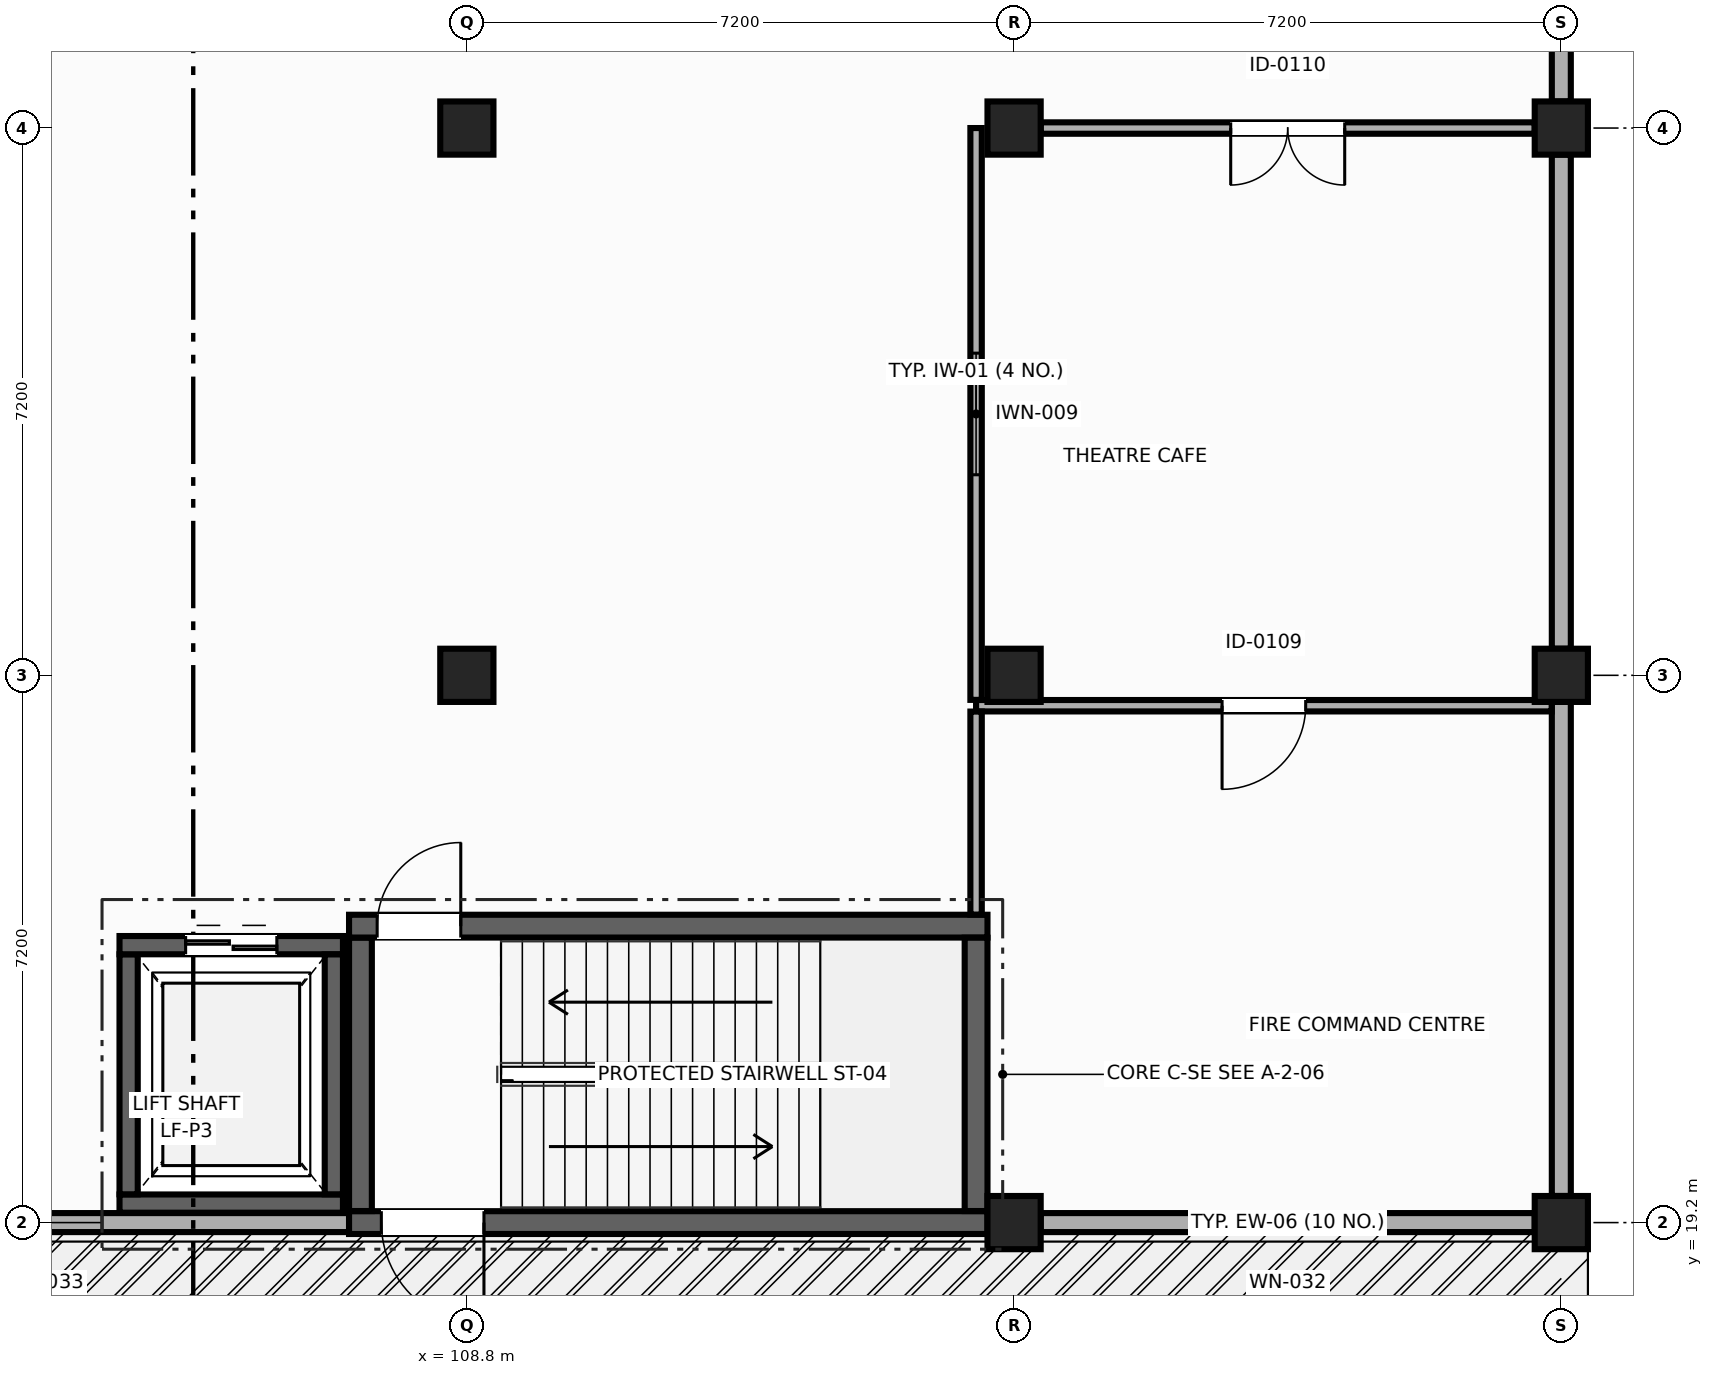
"""IFC4 building model, lengths in metres.
Left out: names, types, materials, properties, quantities, classifications, styles, units other than length and angle.
Written with IfcOpenShell. Run it as: python <this file> out.ifc"""

import sys

from ifc_helpers import new_model, si_unit, direction, frame, frame_2d, origin, origin_2d, place, context, subcontext, project, spatial, rectangle, extrude, element, fill, save


model = new_model("IFC4")
c1 = context("Model", 3, precision=1e-05, world=origin(), true_north=direction((0.0, 1.0)))
c2 = subcontext(c1, "Body", "Model", "MODEL_VIEW")
j1 = project(units=[si_unit("LENGTHUNIT", "METRE"), si_unit("PLANEANGLEUNIT", "RADIAN")], contexts=[c1])
p1 = place(None, origin())
s1 = spatial("IfcSite", under=j1, at=p1, CompositionType="ELEMENT")
p2 = place(p1, origin())
s2 = spatial("IfcBuilding", under=s1, at=p2, CompositionType="ELEMENT")
p3 = place(p2, origin())
s3 = spatial("IfcBuildingStorey", under=s2, at=p3, CompositionType="ELEMENT", Elevation=0.0)
for number, where, z_axis, x_axis in (
    (1, (116.0, 19.2, 0.0), (0.0, 0.0, 1.0), (0.0, 1.0, 0.0)),
    (2, (123.2, 19.2, 0.0), (0.0, 0.0, 1.0), (1.0, 0.0, 0.0)),
    (3, (108.8, 26.4, 0.0), (0.0, 0.0, 1.0), (0.0, 1.0, 0.0)),
    (4, (116.0, 26.4, 0.0), (0.0, 0.0, 1.0), (1.0, 0.0, 0.0)),
    (5, (123.2, 26.4, 0.0), (0.0, 0.0, 1.0), (0.0, 1.0, 0.0)),
    (6, (108.8, 33.6, 0.0), (0.0, 0.0, 1.0), (1.0, 0.0, 0.0)),
    (7, (116.0, 33.6, 0.0), (0.0, 0.0, 1.0), (0.0, 1.0, 0.0)),
    (8, (123.2, 33.6, 0.0), (0.0, 0.0, 1.0), (1.0, 0.0, 0.0)),
):
    element("IfcColumn", number, at=place(p3, frame(where, z_axis=z_axis, x_axis=x_axis)), inside=s3, PredefinedType="COLUMN", context=c2, shape_type="SweptSolid", body=[
        extrude(rectangle(XDim=0.7, YDim=0.7, at=origin_2d()), origin(), (0.0, 0.0, 1.0), 5.4),
    ])
p4 = place(p3, frame((122.85, 19.2, 0.0), z_axis=(0.0, 0.0, 1.0), x_axis=(-1.0, 0.0, 0.0)))
e9 = element("IfcWall", 9, at=p4, inside=s3, PredefinedType="SOLIDWALL", context=c2, shape_type="SweptSolid", body=[
    extrude(rectangle(XDim=6.5, YDim=0.25, at=frame_2d((3.25, 0.0))), origin(), (0.0, 0.0, 1.0), 4.395),
])
p5 = place(p4, frame((2.05, 0.0, 0.9)))
e10 = element("IfcOpeningElement", 10, at=p5, cuts=e9, PredefinedType="OPENING", context=c2, shape_type="SweptSolid", body=[
    extrude(rectangle(XDim=2.4, YDim=1.8, at=frame_2d((1.2, 0.9))), frame((0.0, 0.135, 0.0), z_axis=(0.0, -1.0, 0.0), x_axis=(1.0, 0.0, 0.0)), (0.0, 0.0, 1.0), 0.27),
])
p6 = place(p3, frame((107.25, 19.2, 0.0), z_axis=(0.0, 0.0, 1.0), x_axis=(-1.0, 0.0, 0.0)))
e11 = element("IfcWall", 11, at=p6, inside=s3, PredefinedType="SOLIDWALL", context=c2, shape_type="SweptSolid", body=[
    extrude(rectangle(XDim=5.3, YDim=0.25, at=frame_2d((2.65, 0.0))), origin(), (0.0, 0.0, 1.0), 4.755),
])
p7 = place(p6, frame((3.25, 0.0, 0.9)))
e12 = element("IfcOpeningElement", 12, at=p7, cuts=e11, PredefinedType="OPENING", context=c2, shape_type="SweptSolid", body=[
    extrude(rectangle(XDim=1.5, YDim=2.1, at=frame_2d((0.75, 1.05))), frame((0.0, 0.135, 0.0), z_axis=(0.0, -1.0, 0.0), x_axis=(1.0, 0.0, 0.0)), (0.0, 0.0, 1.0), 0.27),
])
p8 = place(p3, frame((123.2, 40.425, 0.0), z_axis=(0.0, 0.0, 1.0), x_axis=(0.0, -1.0, 0.0)))
e13 = element("IfcWall", 13, at=p8, inside=s3, PredefinedType="SOLIDWALL", context=c2, shape_type="SweptSolid", body=[
    extrude(rectangle(XDim=6.475, YDim=0.25, at=frame_2d((3.238, 0.0))), origin(), (0.0, 0.0, 1.0), 4.295),
])
for number, where, z_axis, x_axis in (
    (14, (123.2, 33.25, 0.0), (0.0, 0.0, 1.0), (0.0, -1.0, 0.0)),
    (15, (123.2, 26.05, 0.0), (0.0, 0.0, 1.0), (0.0, -1.0, 0.0)),
):
    element("IfcWall", number, at=place(p3, frame(where, z_axis=z_axis, x_axis=x_axis)), inside=s3, PredefinedType="SOLIDWALL", context=c2, shape_type="SweptSolid", body=[
        extrude(rectangle(XDim=6.5, YDim=0.25, at=frame_2d((3.25, 0.0))), origin(), (0.0, 0.0, 1.0), 4.295),
    ])
p9 = place(p3, frame((115.65, 19.2, 0.0), z_axis=(0.0, 0.0, 1.0), x_axis=(-1.0, 0.0, 0.0)))
e16 = element("IfcWall", 16, at=p9, inside=s3, PredefinedType="SHEAR", context=c2, shape_type="SweptSolid", body=[
    extrude(rectangle(XDim=8.4, YDim=0.3, at=frame_2d((4.2, 0.0))), origin(), (0.0, 0.0, 1.0), 5.1),
])
p10 = place(p9, frame((6.625, 0.0, 0.0)))
e17 = element("IfcOpeningElement", 17, at=p10, cuts=e16, PredefinedType="OPENING", context=c2, shape_type="SweptSolid", body=[
    extrude(rectangle(XDim=1.35, YDim=2.2, at=frame_2d((0.675, 1.1))), frame((0.0, 0.16, 0.0), z_axis=(0.0, -1.0, 0.0), x_axis=(1.0, 0.0, 0.0)), (0.0, 0.0, 1.0), 0.32),
])
p11 = place(p3, frame((107.4, 19.352, 0.0), z_axis=(0.0, 0.0, 1.0), x_axis=(0.0, 1.0, 0.0)))
e18 = element("IfcWall", 18, at=p11, inside=s3, PredefinedType="SHEAR", context=c2, shape_type="SweptSolid", body=[
    extrude(rectangle(XDim=3.598, YDim=0.3, at=frame_2d((1.799, 0.0))), origin(), (0.0, 0.0, 1.0), 5.1),
])
p12 = place(p3, frame((107.25, 23.1, 0.0), z_axis=(0.0, 0.0, 1.0), x_axis=(1.0, 0.0, 0.0)))
e19 = element("IfcWall", 19, at=p12, inside=s3, PredefinedType="SHEAR", context=c2, shape_type="SweptSolid", body=[
    extrude(rectangle(XDim=8.4, YDim=0.3, at=frame_2d((4.2, 0.0))), origin(), (0.0, 0.0, 1.0), 5.1),
])
p13 = place(p12, frame((0.37, 0.0, 0.0)))
e20 = element("IfcOpeningElement", 20, at=p13, cuts=e19, PredefinedType="OPENING", context=c2, shape_type="SweptSolid", body=[
    extrude(rectangle(XDim=1.1, YDim=2.15, at=frame_2d((0.55, 1.075))), frame((0.0, 0.16, 0.0), z_axis=(0.0, -1.0, 0.0), x_axis=(1.0, 0.0, 0.0)), (0.0, 0.0, 1.0), 0.32),
])
p14 = place(p3, frame((115.5, 22.948, 0.0), z_axis=(0.0, 0.0, 1.0), x_axis=(0.0, -1.0, 0.0)))
e21 = element("IfcWall", 21, at=p14, inside=s3, PredefinedType="SHEAR", context=c2, shape_type="SweptSolid", body=[
    extrude(rectangle(XDim=3.596, YDim=0.3, at=frame_2d((1.798, 0.0))), origin(), (0.0, 0.0, 1.0), 5.1),
])
p15 = place(p3, frame((107.17, 19.45, 0.0), z_axis=(0.0, 0.0, 1.0), x_axis=(-1.0, 0.0, 0.0)))
e22 = element("IfcWall", 22, at=p15, inside=s3, PredefinedType="SHEAR", context=c2, shape_type="SweptSolid", body=[
    extrude(rectangle(XDim=2.94, YDim=0.24, at=frame_2d((1.47, 0.0))), origin(), (0.0, 0.0, 1.0), 5.1),
])
p16 = place(p3, frame((104.35, 19.572, 0.0), z_axis=(0.0, 0.0, 1.0), x_axis=(0.0, 1.0, 0.0)))
e23 = element("IfcWall", 23, at=p16, inside=s3, PredefinedType="SHEAR", context=c2, shape_type="SweptSolid", body=[
    extrude(rectangle(XDim=3.158, YDim=0.24, at=frame_2d((1.579, 0.0))), origin(), (0.0, 0.0, 1.0), 5.1),
])
p17 = place(p3, frame((104.23, 22.85, 0.0), z_axis=(0.0, 0.0, 1.0), x_axis=(1.0, 0.0, 0.0)))
e24 = element("IfcWall", 24, at=p17, inside=s3, PredefinedType="SHEAR", context=c2, shape_type="SweptSolid", body=[
    extrude(rectangle(XDim=2.94, YDim=0.24, at=frame_2d((1.47, 0.0))), origin(), (0.0, 0.0, 1.0), 5.1),
])
p18 = place(p17, frame((0.87, 0.0, 0.0)))
e25 = element("IfcOpeningElement", 25, at=p18, cuts=e24, PredefinedType="OPENING", context=c2, shape_type="SweptSolid", body=[
    extrude(rectangle(XDim=1.2, YDim=2.15, at=frame_2d((0.6, 1.075))), frame((0.0, 0.13, 0.0), z_axis=(0.0, -1.0, 0.0), x_axis=(1.0, 0.0, 0.0)), (0.0, 0.0, 1.0), 0.26),
])
p19 = place(p3, frame((107.05, 22.728, 0.0), z_axis=(0.0, 0.0, 1.0), x_axis=(0.0, -1.0, 0.0)))
e26 = element("IfcWall", 26, at=p19, inside=s3, PredefinedType="SHEAR", context=c2, shape_type="SweptSolid", body=[
    extrude(rectangle(XDim=3.156, YDim=0.24, at=frame_2d((1.578, 0.0))), origin(), (0.0, 0.0, 1.0), 5.1),
])
p20 = place(p3, frame((123.073, 26.0, 0.0), z_axis=(0.0, 0.0, 1.0), x_axis=(-1.0, 0.0, 0.0)))
e27 = element("IfcWall", 27, at=p20, inside=s3, PredefinedType="PARTITIONING", context=c2, shape_type="SweptSolid", body=[
    extrude(rectangle(XDim=7.573, YDim=0.15, at=frame_2d((3.787, 0.0))), origin(), (0.0, 0.0, 1.0), 4.295),
])
p21 = place(p20, frame((3.237, 0.0, 0.0)))
e28 = element("IfcOpeningElement", 28, at=p21, cuts=e27, PredefinedType="OPENING", context=c2, shape_type="SweptSolid", body=[
    extrude(rectangle(XDim=1.1, YDim=2.15, at=frame_2d((0.55, 1.075))), frame((0.0, 0.085, 0.0), z_axis=(0.0, -1.0, 0.0), x_axis=(1.0, 0.0, 0.0)), (0.0, 0.0, 1.0), 0.17),
])
p22 = place(p3, frame((115.5, 25.923, 0.0), z_axis=(0.0, 0.0, 1.0), x_axis=(0.0, -1.0, 0.0)))
e29 = element("IfcWall", 29, at=p22, inside=s3, PredefinedType="PARTITIONING", context=c2, shape_type="SweptSolid", body=[
    extrude(rectangle(XDim=2.671, YDim=0.15, at=frame_2d((1.335, 0.0))), origin(), (0.0, 0.0, 1.0), 5.1),
])
p23 = place(p3, frame((122.85, 33.6, 0.0), z_axis=(0.0, 0.0, 1.0), x_axis=(-1.0, 0.0, 0.0)))
e30 = element("IfcWall", 30, at=p23, inside=s3, PredefinedType="PARTITIONING", context=c2, shape_type="SweptSolid", body=[
    extrude(rectangle(XDim=6.5, YDim=0.15, at=frame_2d((3.25, 0.0))), origin(), (0.0, 0.0, 1.0), 4.295),
])
p24 = place(p23, frame((2.5, 0.0, 0.0)))
e31 = element("IfcOpeningElement", 31, at=p24, cuts=e30, PredefinedType="OPENING", context=c2, shape_type="SweptSolid", body=[
    extrude(rectangle(XDim=1.5, YDim=2.2, at=frame_2d((0.75, 1.1))), frame((0.0, 0.085, 0.0), z_axis=(0.0, -1.0, 0.0), x_axis=(1.0, 0.0, 0.0)), (0.0, 0.0, 1.0), 0.17),
])
p25 = place(p3, frame((115.5, 33.6, 0.0), z_axis=(0.0, 0.0, 1.0), x_axis=(0.0, -1.0, 0.0)))
e32 = element("IfcWall", 32, at=p25, inside=s3, PredefinedType="PARTITIONING", context=c2, shape_type="SweptSolid", body=[
    extrude(rectangle(XDim=7.523, YDim=0.15, at=frame_2d((3.762, 0.0))), origin(), (0.0, 0.0, 1.0), 4.295),
])
p26 = place(p25, frame((2.961, 0.0, 1.1)))
e33 = element("IfcOpeningElement", 33, at=p26, cuts=e32, PredefinedType="OPENING", context=c2, shape_type="SweptSolid", body=[
    extrude(rectangle(XDim=1.6, YDim=1.1, at=frame_2d((0.8, 0.55))), frame((0.0, 0.085, 0.0), z_axis=(0.0, -1.0, 0.0), x_axis=(1.0, 0.0, 0.0)), (0.0, 0.0, 1.0), 0.17),
])
p27 = place(p5, origin())
e34 = element("IfcWindow", 34, at=p27, inside=s3, PartitioningType="SINGLE_PANEL", PredefinedType="WINDOW", context=c2, shape_type="SweptSolid", body=[
    extrude(rectangle(XDim=2.4, YDim=1.8, at=frame_2d((1.2, 0.9))), frame((0.0, 0.03, 0.0), z_axis=(0.0, -1.0, 0.0), x_axis=(1.0, 0.0, 0.0)), (0.0, 0.0, 1.0), 0.06),
])
fill(e10, e34)
p28 = place(p7, origin())
e35 = element("IfcWindow", 35, at=p28, inside=s3, PartitioningType="SINGLE_PANEL", PredefinedType="WINDOW", context=c2, shape_type="SweptSolid", body=[
    extrude(rectangle(XDim=1.5, YDim=2.1, at=frame_2d((0.75, 1.05))), frame((0.0, 0.03, 0.0), z_axis=(0.0, -1.0, 0.0), x_axis=(1.0, 0.0, 0.0)), (0.0, 0.0, 1.0), 0.06),
])
fill(e12, e35)
p29 = place(p10, origin())
e36 = element("IfcDoor", 36, at=p29, inside=s3, OperationType="SINGLE_SWING_LEFT", PredefinedType="DOOR", context=c2, shape_type="SweptSolid", body=[
    extrude(rectangle(XDim=1.35, YDim=2.2, at=frame_2d((0.675, 1.1))), frame((0.0, 0.025, 0.0), z_axis=(0.0, -1.0, 0.0), x_axis=(1.0, 0.0, 0.0)), (0.0, 0.0, 1.0), 0.05),
])
fill(e17, e36)
p30 = place(p13, origin())
e37 = element("IfcDoor", 37, at=p30, inside=s3, OperationType="SINGLE_SWING_RIGHT", PredefinedType="DOOR", context=c2, shape_type="SweptSolid", body=[
    extrude(rectangle(XDim=1.1, YDim=2.15, at=frame_2d((0.55, 1.075))), frame((0.0, 0.025, 0.0), z_axis=(0.0, -1.0, 0.0), x_axis=(1.0, 0.0, 0.0)), (0.0, 0.0, 1.0), 0.05),
])
fill(e20, e37)
p31 = place(p18, origin())
e38 = element("IfcDoor", 38, at=p31, inside=s3, OperationType="DOUBLE_DOOR_SLIDING", PredefinedType="DOOR", context=c2, shape_type="SweptSolid", body=[
    extrude(rectangle(XDim=1.2, YDim=2.15, at=frame_2d((0.6, 1.075))), frame((0.0, 0.025, 0.0), z_axis=(0.0, -1.0, 0.0), x_axis=(1.0, 0.0, 0.0)), (0.0, 0.0, 1.0), 0.05),
])
fill(e25, e38)
p32 = place(p21, origin())
e39 = element("IfcDoor", 39, at=p32, inside=s3, OperationType="SINGLE_SWING_RIGHT", PredefinedType="DOOR", context=c2, shape_type="SweptSolid", body=[
    extrude(rectangle(XDim=1.1, YDim=2.15, at=frame_2d((0.55, 1.075))), frame((0.0, 0.025, 0.0), z_axis=(0.0, -1.0, 0.0), x_axis=(1.0, 0.0, 0.0)), (0.0, 0.0, 1.0), 0.05),
])
fill(e28, e39)
p33 = place(p24, origin())
e40 = element("IfcDoor", 40, at=p33, inside=s3, OperationType="DOUBLE_DOOR_SINGLE_SWING", PredefinedType="DOOR", context=c2, shape_type="SweptSolid", body=[
    extrude(rectangle(XDim=1.5, YDim=2.2, at=frame_2d((0.75, 1.1))), frame((0.0, 0.025, 0.0), z_axis=(0.0, -1.0, 0.0), x_axis=(1.0, 0.0, 0.0)), (0.0, 0.0, 1.0), 0.05),
])
fill(e31, e40)
p34 = place(p26, origin())
e41 = element("IfcWindow", 41, at=p34, inside=s3, PartitioningType="SINGLE_PANEL", PredefinedType="WINDOW", context=c2, shape_type="SweptSolid", body=[
    extrude(rectangle(XDim=1.6, YDim=1.1, at=frame_2d((0.8, 0.55))), frame((0.0, 0.03, 0.0), z_axis=(0.0, -1.0, 0.0), x_axis=(1.0, 0.0, 0.0)), (0.0, 0.0, 1.0), 0.06),
])
fill(e33, e41)
save(model, sys.argv[1])
